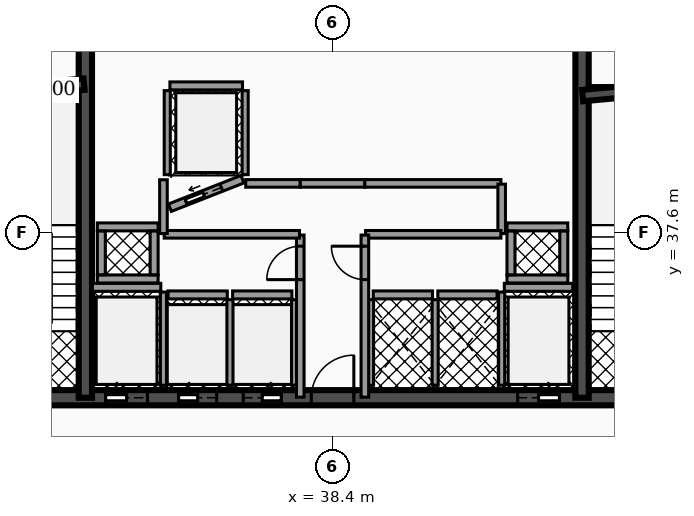
"""IFC4 building model, lengths in metres.
Left out: names, types, materials, properties, quantities, classifications, styles, units other than length and angle.
Written with IfcOpenShell. Run it as: python <this file> out.ifc"""

import sys

from ifc_helpers import new_model, si_unit, direction, frame, frame_2d, origin, place, context, subcontext, project, spatial, rectangle, extrude, element, fill, save


model = new_model("IFC4")
c1 = context("Model", 3, precision=1e-05, world=origin(), true_north=direction((0.0, 1.0)))
c2 = subcontext(c1, "Body", "Model", "MODEL_VIEW")
j1 = project(units=[si_unit("LENGTHUNIT", "METRE"), si_unit("PLANEANGLEUNIT", "RADIAN")], contexts=[c1])
p1 = place(None, origin())
s1 = spatial("IfcSite", under=j1, at=p1, CompositionType="ELEMENT")
p2 = place(p1, origin())
s2 = spatial("IfcBuilding", under=s1, at=p2, CompositionType="ELEMENT")
p3 = place(p2, frame((0.0, 0.0, 127.16)))
s3 = spatial("IfcBuildingStorey", under=s2, at=p3, CompositionType="ELEMENT", Elevation=127.16)
p4 = place(p3, frame((28.4, 33.25, 0.0), z_axis=(0.0, 0.0, 1.0), x_axis=(1.0, 0.0, 0.0)))
e1 = element("IfcWall", 1, at=p4, inside=s3, PredefinedType="SHEAR", context=c2, shape_type="SweptSolid", body=[
    extrude(rectangle(XDim=20.06, YDim=0.4, at=frame_2d((10.03, 0.0))), origin(), (0.0, 0.0, 1.0), 3.5),
])
p5 = place(p4, frame((4.03, 0.0, 0.0)))
e2 = element("IfcOpeningElement", 2, at=p5, cuts=e1, PredefinedType="OPENING", context=c2, shape_type="SweptSolid", body=[
    extrude(rectangle(XDim=1.1, YDim=2.15, at=frame_2d((0.55, 1.075))), frame((0.0, 0.21, 0.0), z_axis=(0.0, -1.0, 0.0), x_axis=(1.0, 0.0, 0.0)), (0.0, 0.0, 1.0), 0.42),
])
p6 = place(p4, frame((14.87, 0.0, 0.0)))
e3 = element("IfcOpeningElement", 3, at=p6, cuts=e1, PredefinedType="OPENING", context=c2, shape_type="SweptSolid", body=[
    extrude(rectangle(XDim=1.1, YDim=2.15, at=frame_2d((0.55, 1.075))), frame((0.0, 0.21, 0.0), z_axis=(0.0, -1.0, 0.0), x_axis=(1.0, 0.0, 0.0)), (0.0, 0.0, 1.0), 0.42),
])
p7 = place(p4, frame((5.95, 0.0, 0.0)))
e4 = element("IfcOpeningElement", 4, at=p7, cuts=e1, PredefinedType="OPENING", context=c2, shape_type="SweptSolid", body=[
    extrude(rectangle(XDim=1.0, YDim=2.1, at=frame_2d((0.5, 1.05))), frame((0.0, 0.21, 0.0), z_axis=(0.0, -1.0, 0.0), x_axis=(1.0, 0.0, 0.0)), (0.0, 0.0, 1.0), 0.42),
])
p8 = place(p4, frame((7.65, 0.0, 0.0)))
e5 = element("IfcOpeningElement", 5, at=p8, cuts=e1, PredefinedType="OPENING", context=c2, shape_type="SweptSolid", body=[
    extrude(rectangle(XDim=1.0, YDim=2.1, at=frame_2d((0.5, 1.05))), frame((0.0, 0.21, 0.0), z_axis=(0.0, -1.0, 0.0), x_axis=(1.0, 0.0, 0.0)), (0.0, 0.0, 1.0), 0.42),
])
p9 = place(p4, frame((1.31, 0.0, 0.0)))
e6 = element("IfcOpeningElement", 6, at=p9, cuts=e1, PredefinedType="OPENING", context=c2, shape_type="SweptSolid", body=[
    extrude(rectangle(XDim=1.1, YDim=2.2, at=frame_2d((0.55, 1.1))), frame((0.0, 0.21, 0.0), z_axis=(0.0, -1.0, 0.0), x_axis=(1.0, 0.0, 0.0)), (0.0, 0.0, 1.0), 0.42),
])
p10 = place(p4, frame((9.44, 0.0, 0.0)))
e7 = element("IfcOpeningElement", 7, at=p10, cuts=e1, PredefinedType="OPENING", context=c2, shape_type="SweptSolid", body=[
    extrude(rectangle(XDim=1.12, YDim=2.05, at=frame_2d((0.56, 1.025))), frame((0.0, 0.21, 0.0), z_axis=(0.0, -1.0, 0.0), x_axis=(1.0, 0.0, 0.0)), (0.0, 0.0, 1.0), 0.42),
])
p11 = place(p4, frame((17.65, 0.0, 0.0)))
e8 = element("IfcOpeningElement", 8, at=p11, cuts=e1, PredefinedType="OPENING", context=c2, shape_type="SweptSolid", body=[
    extrude(rectangle(XDim=1.1, YDim=2.2, at=frame_2d((0.55, 1.1))), frame((0.0, 0.21, 0.0), z_axis=(0.0, -1.0, 0.0), x_axis=(1.0, 0.0, 0.0)), (0.0, 0.0, 1.0), 0.42),
])
for number, where, z_axis, x_axis in (
    (9, (31.895, 33.25, 0.0), (0.0, 0.0, 1.0), (0.0, 1.0, 0.0)),
    (10, (44.965, 33.25, 0.0), (0.0, 0.0, 1.0), (0.0, 1.0, 0.0)),
):
    element("IfcWall", number, at=place(p3, frame(where, z_axis=z_axis, x_axis=x_axis)), inside=s3, PredefinedType="SHEAR", context=c2, shape_type="SweptSolid", body=[
        extrude(rectangle(XDim=10.2, YDim=0.35, at=frame_2d((5.1, 0.0))), origin(), (0.0, 0.0, 1.0), 3.5),
    ])
p12 = place(p3, frame((28.64, 41.2, 0.0), z_axis=(0.0, 0.0, 1.0), x_axis=(0.995687118776, 0.092774789157, 0.0)))
e11 = element("IfcWall", 11, at=p12, inside=s3, PredefinedType="SHEAR", context=c2, shape_type="SweptSolid", body=[
    extrude(rectangle(XDim=3.234, YDim=0.3, at=frame_2d((1.617, 0.0))), origin(), (0.0, 0.0, 1.0), 3.5),
])
p13 = place(p3, frame((44.98, 41.2, 0.0), z_axis=(0.0, 0.0, 1.0), x_axis=(0.995686468965, 0.09278176286, 0.0)))
e12 = element("IfcWall", 12, at=p13, inside=s3, PredefinedType="SHEAR", context=c2, shape_type="SweptSolid", body=[
    extrude(rectangle(XDim=3.234, YDim=0.3, at=frame_2d((1.617, 0.0))), origin(), (0.0, 0.0, 1.0), 3.5),
])
p14 = place(p3, frame((32.08, 36.155, 0.0), z_axis=(0.0, 0.0, 1.0), x_axis=(1.0, 0.0, 0.0)))
e13 = element("IfcWall", 13, at=p14, inside=s3, PredefinedType="SOLIDWALL", context=c2, shape_type="SweptSolid", body=[
    extrude(rectangle(XDim=1.8, YDim=0.21, at=frame_2d((0.9, 0.0))), origin(), (0.0, 0.0, 1.0), 2.472),
])
p15 = place(p3, frame((33.95, 33.58, 0.0), z_axis=(0.0, 0.0, 1.0), x_axis=(0.0, 1.0, 0.0)))
e14 = element("IfcWall", 14, at=p15, inside=s3, PredefinedType="SOLIDWALL", context=c2, shape_type="SweptSolid", body=[
    extrude(rectangle(XDim=2.45, YDim=0.16, at=frame_2d((1.225, 0.0))), origin(), (0.0, 0.0, 1.0), 2.472),
])
p16 = place(p3, frame((42.92, 36.155, 0.0), z_axis=(0.0, 0.0, 1.0), x_axis=(1.0, 0.0, 0.0)))
e15 = element("IfcWall", 15, at=p16, inside=s3, PredefinedType="SOLIDWALL", context=c2, shape_type="SweptSolid", body=[
    extrude(rectangle(XDim=1.8, YDim=0.21, at=frame_2d((0.9, 0.0))), origin(), (0.0, 0.0, 1.0), 2.472),
])
p17 = place(p3, frame((42.85, 33.58, 0.0), z_axis=(0.0, 0.0, 1.0), x_axis=(0.0, 1.0, 0.0)))
e16 = element("IfcWall", 16, at=p17, inside=s3, PredefinedType="SOLIDWALL", context=c2, shape_type="SweptSolid", body=[
    extrude(rectangle(XDim=2.45, YDim=0.16, at=frame_2d((1.225, 0.0))), origin(), (0.0, 0.0, 1.0), 2.472),
])
p18 = place(p3, frame((34.07, 35.955, 0.0), z_axis=(0.0, 0.0, 1.0), x_axis=(1.0, 0.0, 0.0)))
e17 = element("IfcWall", 17, at=p18, inside=s3, PredefinedType="SOLIDWALL", context=c2, shape_type="SweptSolid", body=[
    extrude(rectangle(XDim=1.56, YDim=0.21, at=frame_2d((0.78, 0.0))), origin(), (0.0, 0.0, 1.0), 2.472),
])
p19 = place(p3, frame((35.7, 33.58, 0.0), z_axis=(0.0, 0.0, 1.0), x_axis=(0.0, 1.0, 0.0)))
e18 = element("IfcWall", 18, at=p19, inside=s3, PredefinedType="SOLIDWALL", context=c2, shape_type="SweptSolid", body=[
    extrude(rectangle(XDim=2.25, YDim=0.16, at=frame_2d((1.125, 0.0))), origin(), (0.0, 0.0, 1.0), 2.472),
])
p20 = place(p3, frame((35.77, 35.955, 0.0), z_axis=(0.0, 0.0, 1.0), x_axis=(1.0, 0.0, 0.0)))
e19 = element("IfcWall", 19, at=p20, inside=s3, PredefinedType="SOLIDWALL", context=c2, shape_type="SweptSolid", body=[
    extrude(rectangle(XDim=1.56, YDim=0.21, at=frame_2d((0.78, 0.0))), origin(), (0.0, 0.0, 1.0), 2.472),
])
p21 = place(p3, frame((37.4, 33.58, 0.0), z_axis=(0.0, 0.0, 1.0), x_axis=(0.0, 1.0, 0.0)))
e20 = element("IfcWall", 20, at=p21, inside=s3, PredefinedType="SOLIDWALL", context=c2, shape_type="SweptSolid", body=[
    extrude(rectangle(XDim=2.25, YDim=0.16, at=frame_2d((1.125, 0.0))), origin(), (0.0, 0.0, 1.0), 2.472),
])
p22 = place(p3, frame((34.12, 38.25, 0.0), z_axis=(0.0, 0.0, 1.0), x_axis=(0.930804993012, 0.36551616241, 0.0)))
e21 = element("IfcWall", 21, at=p22, inside=s3, PredefinedType="SOLIDWALL", context=c2, shape_type="SweptSolid", body=[
    extrude(rectangle(XDim=2.052, YDim=0.21, at=frame_2d((1.026, 0.0))), origin(), (0.0, 0.0, 1.0), 2.472),
])
p23 = place(p22, frame((0.455, 0.0, 0.0)))
e22 = element("IfcOpeningElement", 22, at=p23, cuts=e21, PredefinedType="OPENING", context=c2, shape_type="SweptSolid", body=[
    extrude(rectangle(XDim=1.0, YDim=2.1, at=frame_2d((0.5, 1.05))), frame((0.0, 0.115, 0.0), z_axis=(0.0, -1.0, 0.0), x_axis=(1.0, 0.0, 0.0)), (0.0, 0.0, 1.0), 0.23),
])
p24 = place(p3, frame((34.12, 41.455, 0.0), z_axis=(0.0, 0.0, 1.0), x_axis=(1.0, 0.0, 0.0)))
e23 = element("IfcWall", 23, at=p24, inside=s3, PredefinedType="SOLIDWALL", context=c2, shape_type="SweptSolid", body=[
    extrude(rectangle(XDim=1.91, YDim=0.21, at=frame_2d((0.955, 0.0))), origin(), (0.0, 0.0, 1.0), 2.472),
])
for number, where, z_axis, x_axis in (
    (24, (34.05, 39.12, 0.0), (0.0, 0.0, 1.0), (0.0, 1.0, 0.0)),
    (25, (36.1, 39.12, 0.0), (0.0, 0.0, 1.0), (0.0, 1.0, 0.0)),
):
    element("IfcWall", number, at=place(p3, frame(where, z_axis=z_axis, x_axis=x_axis)), inside=s3, PredefinedType="SOLIDWALL", context=c2, shape_type="SweptSolid", body=[
        extrude(rectangle(XDim=2.21, YDim=0.16, at=frame_2d((1.105, 0.0))), origin(), (0.0, 0.0, 1.0), 2.472),
    ])
p25 = place(p3, frame((39.47, 35.955, 0.0), z_axis=(0.0, 0.0, 1.0), x_axis=(1.0, 0.0, 0.0)))
e26 = element("IfcWall", 26, at=p25, inside=s3, PredefinedType="SOLIDWALL", context=c2, shape_type="SweptSolid", body=[
    extrude(rectangle(XDim=1.56, YDim=0.21, at=frame_2d((0.78, 0.0))), origin(), (0.0, 0.0, 1.0), 2.472),
])
for number, where, z_axis, x_axis in (
    (27, (39.4, 33.58, 0.0), (0.0, 0.0, 1.0), (0.0, 1.0, 0.0)),
    (28, (41.1, 33.58, 0.0), (0.0, 0.0, 1.0), (0.0, 1.0, 0.0)),
):
    element("IfcWall", number, at=place(p3, frame(where, z_axis=z_axis, x_axis=x_axis)), inside=s3, PredefinedType="SOLIDWALL", context=c2, shape_type="SweptSolid", body=[
        extrude(rectangle(XDim=2.25, YDim=0.16, at=frame_2d((1.125, 0.0))), origin(), (0.0, 0.0, 1.0), 2.472),
    ])
p26 = place(p3, frame((41.17, 35.955, 0.0), z_axis=(0.0, 0.0, 1.0), x_axis=(1.0, 0.0, 0.0)))
e29 = element("IfcWall", 29, at=p26, inside=s3, PredefinedType="SOLIDWALL", context=c2, shape_type="SweptSolid", body=[
    extrude(rectangle(XDim=1.56, YDim=0.21, at=frame_2d((0.78, 0.0))), origin(), (0.0, 0.0, 1.0), 2.472),
])
for number, where, z_axis, x_axis in (
    (30, (32.21, 36.375, 0.0), (0.0, 0.0, 1.0), (1.0, 0.0, 0.0)),
    (31, (32.21, 37.745, 0.0), (0.0, 0.0, 1.0), (1.0, 0.0, 0.0)),
):
    element("IfcWall", number, at=place(p3, frame(where, z_axis=z_axis, x_axis=x_axis)), inside=s3, PredefinedType="SOLIDWALL", context=c2, shape_type="SweptSolid", body=[
        extrude(rectangle(XDim=1.6, YDim=0.21, at=frame_2d((0.8, 0.0))), origin(), (0.0, 0.0, 1.0), 3.5),
    ])
for number, where, z_axis, x_axis in (
    (32, (32.315, 36.485, 0.0), (0.0, 0.0, 1.0), (0.0, 1.0, 0.0)),
    (33, (33.705, 36.485, 0.0), (0.0, 0.0, 1.0), (0.0, 1.0, 0.0)),
):
    element("IfcWall", number, at=place(p3, frame(where, z_axis=z_axis, x_axis=x_axis)), inside=s3, PredefinedType="SOLIDWALL", context=c2, shape_type="SweptSolid", body=[
        extrude(rectangle(XDim=1.15, YDim=0.21, at=frame_2d((0.575, 0.0))), origin(), (0.0, 0.0, 1.0), 3.5),
    ])
for number, where, z_axis, x_axis in (
    (34, (42.99, 36.375, 0.0), (0.0, 0.0, 1.0), (1.0, 0.0, 0.0)),
    (35, (42.99, 37.745, 0.0), (0.0, 0.0, 1.0), (1.0, 0.0, 0.0)),
):
    element("IfcWall", number, at=place(p3, frame(where, z_axis=z_axis, x_axis=x_axis)), inside=s3, PredefinedType="SOLIDWALL", context=c2, shape_type="SweptSolid", body=[
        extrude(rectangle(XDim=1.6, YDim=0.21, at=frame_2d((0.8, 0.0))), origin(), (0.0, 0.0, 1.0), 3.5),
    ])
for number, where, z_axis, x_axis in (
    (36, (43.095, 36.485, 0.0), (0.0, 0.0, 1.0), (0.0, 1.0, 0.0)),
    (37, (44.485, 36.485, 0.0), (0.0, 0.0, 1.0), (0.0, 1.0, 0.0)),
):
    element("IfcWall", number, at=place(p3, frame(where, z_axis=z_axis, x_axis=x_axis)), inside=s3, PredefinedType="SOLIDWALL", context=c2, shape_type="SweptSolid", body=[
        extrude(rectangle(XDim=1.15, YDim=0.21, at=frame_2d((0.575, 0.0))), origin(), (0.0, 0.0, 1.0), 3.5),
    ])
p27 = place(p3, frame((37.55, 33.265, 0.0), z_axis=(0.0, 0.0, 1.0), x_axis=(0.0, 1.0, 0.0)))
e38 = element("IfcWall", 38, at=p27, inside=s3, PredefinedType="PARTITIONING", context=c2, shape_type="SweptSolid", body=[
    extrude(rectangle(XDim=4.265, YDim=0.2, at=frame_2d((2.133, 0.0))), origin(), (0.0, 0.0, 1.0), 2.457),
])
p28 = place(p27, frame((3.093, 0.0, 0.0)))
e39 = element("IfcOpeningElement", 39, at=p28, cuts=e38, PredefinedType="OPENING", context=c2, shape_type="SweptSolid", body=[
    extrude(rectangle(XDim=0.88, YDim=2.05, at=frame_2d((0.44, 1.025))), frame((0.0, 0.11, 0.0), z_axis=(0.0, -1.0, 0.0), x_axis=(1.0, 0.0, 0.0)), (0.0, 0.0, 1.0), 0.22),
])
p29 = place(p3, frame((33.97, 37.55, 0.0), z_axis=(0.0, 0.0, 1.0), x_axis=(1.0, 0.0, 0.0)))
e40 = element("IfcWall", 40, at=p29, inside=s3, PredefinedType="PARTITIONING", context=c2, shape_type="SweptSolid", body=[
    extrude(rectangle(XDim=3.56, YDim=0.2, at=frame_2d((1.78, 0.0))), origin(), (0.0, 0.0, 1.0), 2.457),
])
p30 = place(p3, frame((33.95, 37.57, 0.0), z_axis=(0.0, 0.0, 1.0), x_axis=(0.0, 1.0, 0.0)))
e41 = element("IfcWall", 41, at=p30, inside=s3, PredefinedType="PARTITIONING", context=c2, shape_type="SweptSolid", body=[
    extrude(rectangle(XDim=1.415, YDim=0.2, at=frame_2d((0.708, 0.0))), origin(), (0.0, 0.0, 1.0), 2.457),
])
p31 = place(p3, frame((36.115, 38.89, 0.0), z_axis=(0.0, 0.0, 1.0), x_axis=(1.0, 0.0, 0.0)))
e42 = element("IfcWall", 42, at=p31, inside=s3, PredefinedType="PARTITIONING", context=c2, shape_type="SweptSolid", body=[
    extrude(rectangle(XDim=1.435, YDim=0.2, at=frame_2d((0.718, 0.0))), origin(), (0.0, 0.0, 1.0), 2.457),
])
p32 = place(p3, frame((37.55, 38.89, 0.0), z_axis=(0.0, 0.0, 1.0), x_axis=(1.0, 0.0, 0.0)))
e43 = element("IfcWall", 43, at=p32, inside=s3, PredefinedType="PARTITIONING", context=c2, shape_type="SweptSolid", body=[
    extrude(rectangle(XDim=1.7, YDim=0.2, at=frame_2d((0.85, 0.0))), origin(), (0.0, 0.0, 1.0), 2.457),
])
p33 = place(p3, frame((39.25, 38.89, 0.0), z_axis=(0.0, 0.0, 1.0), x_axis=(1.0, 0.0, 0.0)))
e44 = element("IfcWall", 44, at=p33, inside=s3, PredefinedType="PARTITIONING", context=c2, shape_type="SweptSolid", body=[
    extrude(rectangle(XDim=3.58, YDim=0.2, at=frame_2d((1.79, 0.0))), origin(), (0.0, 0.0, 1.0), 2.457),
])
p34 = place(p3, frame((42.85, 37.57, 0.0), z_axis=(0.0, 0.0, 1.0), x_axis=(0.0, 1.0, 0.0)))
e45 = element("IfcWall", 45, at=p34, inside=s3, PredefinedType="PARTITIONING", context=c2, shape_type="SweptSolid", body=[
    extrude(rectangle(XDim=1.3, YDim=0.2, at=frame_2d((0.65, 0.0))), origin(), (0.0, 0.0, 1.0), 2.457),
])
p35 = place(p3, frame((39.27, 37.55, 0.0), z_axis=(0.0, 0.0, 1.0), x_axis=(1.0, 0.0, 0.0)))
e46 = element("IfcWall", 46, at=p35, inside=s3, PredefinedType="PARTITIONING", context=c2, shape_type="SweptSolid", body=[
    extrude(rectangle(XDim=3.56, YDim=0.2, at=frame_2d((1.78, 0.0))), origin(), (0.0, 0.0, 1.0), 2.457),
])
p36 = place(p3, frame((39.25, 33.265, 0.0), z_axis=(0.0, 0.0, 1.0), x_axis=(0.0, 1.0, 0.0)))
e47 = element("IfcWall", 47, at=p36, inside=s3, PredefinedType="PARTITIONING", context=c2, shape_type="SweptSolid", body=[
    extrude(rectangle(XDim=4.265, YDim=0.2, at=frame_2d((2.133, 0.0))), origin(), (0.0, 0.0, 1.0), 2.457),
])
p37 = place(p36, frame((3.093, 0.0, 0.0)))
e48 = element("IfcOpeningElement", 48, at=p37, cuts=e47, PredefinedType="OPENING", context=c2, shape_type="SweptSolid", body=[
    extrude(rectangle(XDim=0.88, YDim=2.05, at=frame_2d((0.44, 1.025))), frame((0.0, 0.11, 0.0), z_axis=(0.0, -1.0, 0.0), x_axis=(1.0, 0.0, 0.0)), (0.0, 0.0, 1.0), 0.22),
])
p38 = place(p5, origin())
e49 = element("IfcDoor", 49, at=p38, inside=s3, OperationType="SLIDING_TO_LEFT", PredefinedType="DOOR", context=c2, shape_type="SweptSolid", body=[
    extrude(rectangle(XDim=1.1, YDim=2.15, at=frame_2d((0.55, 1.075))), frame((0.0, 0.025, 0.0), z_axis=(0.0, -1.0, 0.0), x_axis=(1.0, 0.0, 0.0)), (0.0, 0.0, 1.0), 0.05),
])
fill(e2, e49)
p39 = place(p6, origin())
e50 = element("IfcDoor", 50, at=p39, inside=s3, OperationType="SLIDING_TO_RIGHT", PredefinedType="DOOR", context=c2, shape_type="SweptSolid", body=[
    extrude(rectangle(XDim=1.1, YDim=2.15, at=frame_2d((0.55, 1.075))), frame((0.0, 0.025, 0.0), z_axis=(0.0, -1.0, 0.0), x_axis=(1.0, 0.0, 0.0)), (0.0, 0.0, 1.0), 0.05),
])
fill(e3, e50)
p40 = place(p7, origin())
e51 = element("IfcDoor", 51, at=p40, inside=s3, OperationType="SLIDING_TO_LEFT", PredefinedType="DOOR", context=c2, shape_type="SweptSolid", body=[
    extrude(rectangle(XDim=1.0, YDim=2.1, at=frame_2d((0.5, 1.05))), frame((0.0, 0.025, 0.0), z_axis=(0.0, -1.0, 0.0), x_axis=(1.0, 0.0, 0.0)), (0.0, 0.0, 1.0), 0.05),
])
fill(e4, e51)
p41 = place(p8, origin())
e52 = element("IfcDoor", 52, at=p41, inside=s3, OperationType="SLIDING_TO_RIGHT", PredefinedType="DOOR", context=c2, shape_type="SweptSolid", body=[
    extrude(rectangle(XDim=1.0, YDim=2.1, at=frame_2d((0.5, 1.05))), frame((0.0, 0.025, 0.0), z_axis=(0.0, -1.0, 0.0), x_axis=(1.0, 0.0, 0.0)), (0.0, 0.0, 1.0), 0.05),
])
fill(e5, e52)
p42 = place(p23, origin())
e53 = element("IfcDoor", 53, at=p42, inside=s3, OperationType="SLIDING_TO_LEFT", PredefinedType="DOOR", context=c2, shape_type="SweptSolid", body=[
    extrude(rectangle(XDim=1.0, YDim=2.1, at=frame_2d((0.5, 1.05))), frame((0.0, 0.025, 0.0), z_axis=(0.0, -1.0, 0.0), x_axis=(1.0, 0.0, 0.0)), (0.0, 0.0, 1.0), 0.05),
])
fill(e22, e53)
p43 = place(p10, origin())
e54 = element("IfcDoor", 54, at=p43, inside=s3, OperationType="SINGLE_SWING_RIGHT", PredefinedType="DOOR", context=c2, shape_type="SweptSolid", body=[
    extrude(rectangle(XDim=1.12, YDim=2.05, at=frame_2d((0.56, 1.025))), frame((0.0, 0.025, 0.0), z_axis=(0.0, -1.0, 0.0), x_axis=(1.0, 0.0, 0.0)), (0.0, 0.0, 1.0), 0.05),
])
fill(e7, e54)
p44 = place(p28, origin())
e55 = element("IfcDoor", 55, at=p44, inside=s3, OperationType="SINGLE_SWING_LEFT", PredefinedType="DOOR", context=c2, shape_type="SweptSolid", body=[
    extrude(rectangle(XDim=0.88, YDim=2.05, at=frame_2d((0.44, 1.025))), frame((0.0, 0.025, 0.0), z_axis=(0.0, -1.0, 0.0), x_axis=(1.0, 0.0, 0.0)), (0.0, 0.0, 1.0), 0.05),
])
fill(e39, e55)
p45 = place(p37, origin())
e56 = element("IfcDoor", 56, at=p45, inside=s3, OperationType="SINGLE_SWING_RIGHT", PredefinedType="DOOR", context=c2, shape_type="SweptSolid", body=[
    extrude(rectangle(XDim=0.88, YDim=2.05, at=frame_2d((0.44, 1.025))), frame((0.0, 0.025, 0.0), z_axis=(0.0, -1.0, 0.0), x_axis=(1.0, 0.0, 0.0)), (0.0, 0.0, 1.0), 0.05),
])
fill(e48, e56)
save(model, sys.argv[1])
